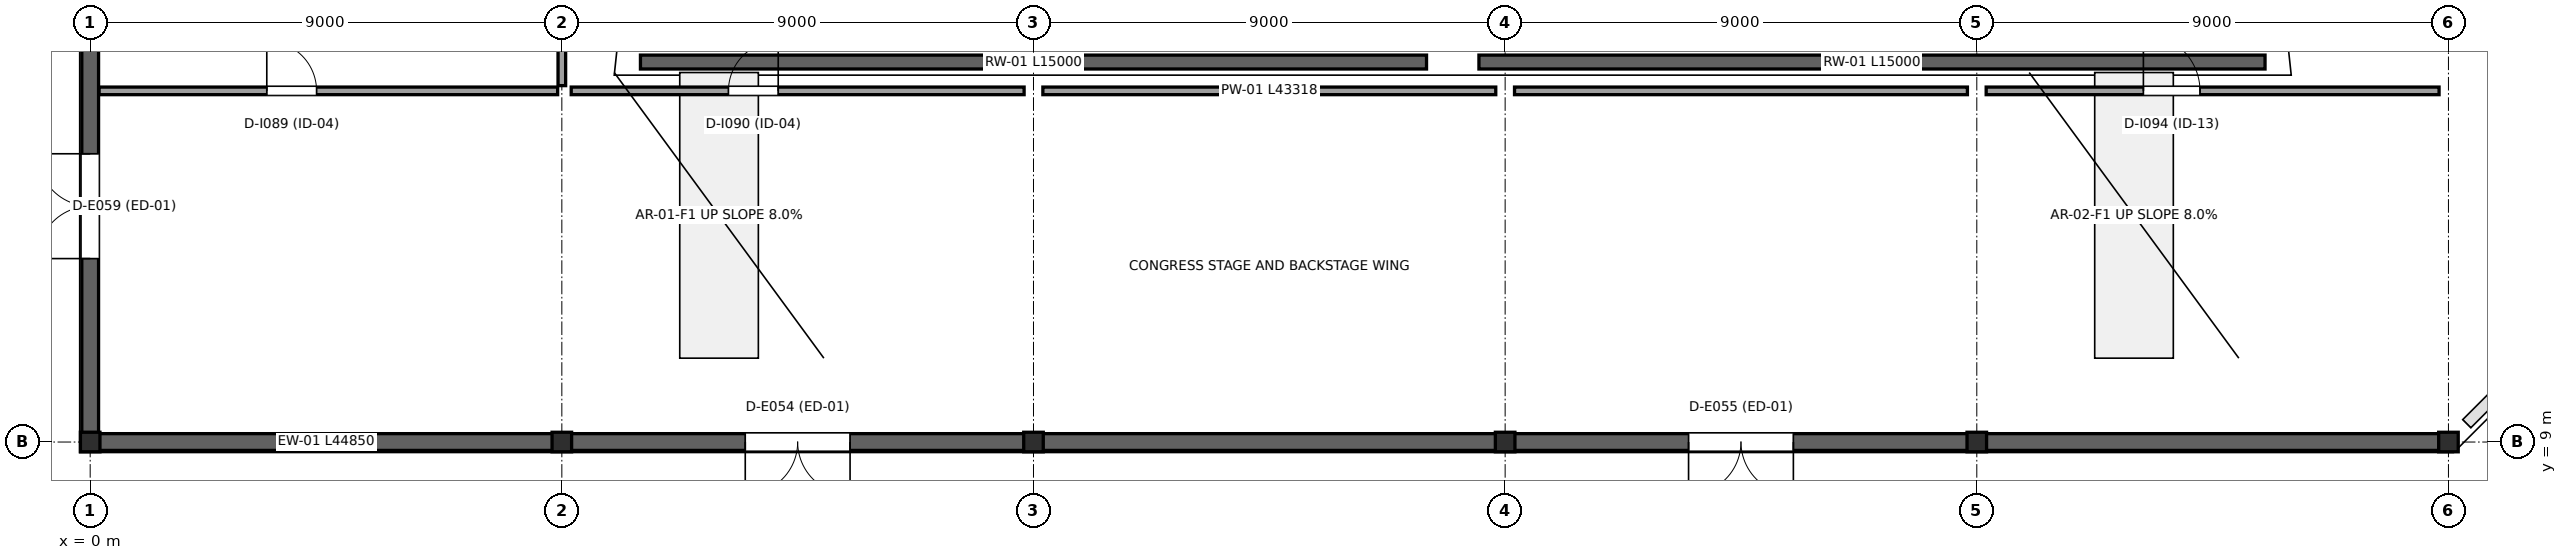
"""IFC4 building model, lengths in metres.
Left out: names, types, materials, properties, quantities, classifications, styles, units other than length and angle.
Written with IfcOpenShell. Run it as: python <this file> out.ifc"""

import sys

from ifc_helpers import new_model, si_unit, direction, frame, frame_2d, origin, origin_2d, place, context, subcontext, project, spatial, rectangle, i_section, extrude, element, fill, save


model = new_model("IFC4")
c1 = context("Model", 3, precision=1e-05, world=origin(), true_north=direction((0.0, 1.0)))
c2 = subcontext(c1, "Body", "Model", "MODEL_VIEW")
j1 = project(units=[si_unit("LENGTHUNIT", "METRE"), si_unit("PLANEANGLEUNIT", "RADIAN")], contexts=[c1])
p1 = place(None, origin())
s1 = spatial("IfcSite", under=j1, at=p1, CompositionType="ELEMENT")
p2 = place(p1, origin())
s2 = spatial("IfcBuilding", under=s1, at=p2, CompositionType="ELEMENT")
p3 = place(p2, origin())
s3 = spatial("IfcBuildingStorey", under=s2, at=p3, CompositionType="ELEMENT", Elevation=0.0)
for number, where, z_axis, x_axis in (
    (1, (0.0, 9.0, 0.0), (0.0, 0.0, 1.0), (1.0, 0.0, 0.0)),
    (2, (9.0, 9.0, 0.0), (0.0, 0.0, 1.0), (1.0, 0.0, 0.0)),
    (3, (18.0, 9.0, 0.0), (0.0, 0.0, 1.0), (1.0, 0.0, 0.0)),
    (4, (27.0, 9.0, 0.0), (0.0, 0.0, 1.0), (1.0, 0.0, 0.0)),
    (5, (36.0, 9.0, 0.0), (0.0, 0.0, 1.0), (1.0, 0.0, 0.0)),
    (6, (45.0, 9.0, 0.0), (0.0, 0.0, 1.0), (1.0, 0.0, 0.0)),
):
    element("IfcColumn", number, at=place(p3, frame(where, z_axis=z_axis, x_axis=x_axis)), inside=s3, PredefinedType="COLUMN", context=c2, shape_type="SweptSolid", body=[
        extrude(i_section(OverallWidth=0.373, OverallDepth=0.373, WebThickness=0.016, FlangeThickness=0.026, at=origin_2d()), origin(), (0.0, 0.0, 1.0), 6.0),
    ])
for number, where, z_axis, x_axis in (
    (7, (10.5, 16.25, 0.0), (0.0, 0.0, 1.0), (1.0, 0.0, 0.0)),
    (8, (26.5, 16.25, 0.0), (0.0, 0.0, 1.0), (1.0, 0.0, 0.0)),
):
    element("IfcWall", number, at=place(p3, frame(where, z_axis=z_axis, x_axis=x_axis)), inside=s3, PredefinedType="SHEAR", context=c2, shape_type="SweptSolid", body=[
        extrude(rectangle(XDim=15.0, YDim=0.265, at=frame_2d((7.5, 0.0))), origin(), (0.0, 0.0, 1.0), 0.13),
    ])
p4 = place(p3, frame((8.985, 9.0, 0.0), z_axis=(0.0, 0.0, 1.0), x_axis=(-1.0, 0.0, 0.0)))
e9 = element("IfcWall", 9, at=p4, inside=s3, PredefinedType="STANDARD", context=c2, shape_type="SweptSolid", body=[
    extrude(rectangle(XDim=8.97, YDim=0.32, at=frame_2d((4.485, 0.0))), origin(), (0.0, 0.0, 1.0), 6.0),
])
p5 = place(p3, frame((17.985, 9.0, 0.0), z_axis=(0.0, 0.0, 1.0), x_axis=(-1.0, 0.0, 0.0)))
e10 = element("IfcWall", 10, at=p5, inside=s3, PredefinedType="STANDARD", context=c2, shape_type="SweptSolid", body=[
    extrude(rectangle(XDim=8.97, YDim=0.32, at=frame_2d((4.485, 0.0))), origin(), (0.0, 0.0, 1.0), 6.0),
])
p6 = place(p5, frame((3.485, 0.0, 0.0)))
e11 = element("IfcOpeningElement", 11, at=p6, cuts=e10, PredefinedType="OPENING", context=c2, shape_type="SweptSolid", body=[
    extrude(rectangle(XDim=2.0, YDim=2.4, at=frame_2d((1.0, 1.2))), frame((0.0, 0.17, 0.0), z_axis=(0.0, -1.0, 0.0), x_axis=(1.0, 0.0, 0.0)), (0.0, 0.0, 1.0), 0.34),
])
p7 = place(p3, frame((26.985, 9.0, 0.0), z_axis=(0.0, 0.0, 1.0), x_axis=(-1.0, 0.0, 0.0)))
e12 = element("IfcWall", 12, at=p7, inside=s3, PredefinedType="STANDARD", context=c2, shape_type="SweptSolid", body=[
    extrude(rectangle(XDim=8.97, YDim=0.32, at=frame_2d((4.485, 0.0))), origin(), (0.0, 0.0, 1.0), 6.0),
])
p8 = place(p3, frame((35.985, 9.0, 0.0), z_axis=(0.0, 0.0, 1.0), x_axis=(-1.0, 0.0, 0.0)))
e13 = element("IfcWall", 13, at=p8, inside=s3, PredefinedType="STANDARD", context=c2, shape_type="SweptSolid", body=[
    extrude(rectangle(XDim=8.97, YDim=0.32, at=frame_2d((4.485, 0.0))), origin(), (0.0, 0.0, 1.0), 6.0),
])
p9 = place(p8, frame((3.485, 0.0, 0.0)))
e14 = element("IfcOpeningElement", 14, at=p9, cuts=e13, PredefinedType="OPENING", context=c2, shape_type="SweptSolid", body=[
    extrude(rectangle(XDim=2.0, YDim=2.4, at=frame_2d((1.0, 1.2))), frame((0.0, 0.17, 0.0), z_axis=(0.0, -1.0, 0.0), x_axis=(1.0, 0.0, 0.0)), (0.0, 0.0, 1.0), 0.34),
])
p10 = place(p3, frame((44.985, 9.0, 0.0), z_axis=(0.0, 0.0, 1.0), x_axis=(-1.0, 0.0, 0.0)))
e15 = element("IfcWall", 15, at=p10, inside=s3, PredefinedType="STANDARD", context=c2, shape_type="SweptSolid", body=[
    extrude(rectangle(XDim=8.97, YDim=0.32, at=frame_2d((4.485, 0.0))), origin(), (0.0, 0.0, 1.0), 6.0),
])
p11 = place(p3, frame((0.0, 9.18, 0.0), z_axis=(0.0, 0.0, 1.0), x_axis=(0.0, 1.0, 0.0)))
e16 = element("IfcWall", 16, at=p11, inside=s3, PredefinedType="STANDARD", context=c2, shape_type="SweptSolid", body=[
    extrude(rectangle(XDim=8.64, YDim=0.32, at=frame_2d((4.32, 0.0))), origin(), (0.0, 0.0, 1.0), 6.0),
])
p12 = place(p11, frame((3.32, 0.0, 0.0)))
e17 = element("IfcOpeningElement", 17, at=p12, cuts=e16, PredefinedType="OPENING", context=c2, shape_type="SweptSolid", body=[
    extrude(rectangle(XDim=2.0, YDim=2.4, at=frame_2d((1.0, 1.2))), frame((0.0, 0.17, 0.0), z_axis=(0.0, -1.0, 0.0), x_axis=(1.0, 0.0, 0.0)), (0.0, 0.0, 1.0), 0.34),
])
p13 = place(p3, frame((9.0, 15.8, 0.0), z_axis=(0.0, 0.0, 1.0), x_axis=(0.0, 1.0, 0.0)))
e18 = element("IfcWall", 18, at=p13, inside=s3, PredefinedType="PARTITIONING", context=c2, shape_type="SweptSolid", body=[
    extrude(rectangle(XDim=10.95, YDim=0.145, at=frame_2d((5.475, 0.0))), origin(), (0.0, 0.0, 1.0), 4.65),
])
p14 = place(p13, frame((3.0, 0.0, 0.0)))
e19 = element("IfcOpeningElement", 19, at=p14, cuts=e18, PredefinedType="OPENING", context=c2, shape_type="SweptSolid", body=[
    extrude(rectangle(XDim=0.95, YDim=2.12, at=frame_2d((0.475, 1.06))), frame((0.0, 0.083, 0.0), z_axis=(0.0, -1.0, 0.0), x_axis=(1.0, 0.0, 0.0)), (0.0, 0.0, 1.0), 0.165),
])
p15 = place(p3, frame((0.17, 15.7, 0.0), z_axis=(0.0, 0.0, 1.0), x_axis=(1.0, 0.0, 0.0)))
e20 = element("IfcWall", 20, at=p15, inside=s3, PredefinedType="PARTITIONING", context=c2, shape_type="SweptSolid", body=[
    extrude(rectangle(XDim=8.75, YDim=0.145, at=frame_2d((4.375, 0.0))), origin(), (0.0, 0.0, 1.0), 4.65),
])
p16 = place(p15, frame((3.2, 0.0, 0.0)))
e21 = element("IfcOpeningElement", 21, at=p16, cuts=e20, PredefinedType="OPENING", context=c2, shape_type="SweptSolid", body=[
    extrude(rectangle(XDim=0.95, YDim=2.12, at=frame_2d((0.475, 1.06))), frame((0.0, 0.083, 0.0), z_axis=(0.0, -1.0, 0.0), x_axis=(1.0, 0.0, 0.0)), (0.0, 0.0, 1.0), 0.165),
])
p17 = place(p3, frame((9.179, 15.7, 0.0), z_axis=(0.0, 0.0, 1.0), x_axis=(1.0, 0.0, 0.0)))
e22 = element("IfcWall", 22, at=p17, inside=s3, PredefinedType="PARTITIONING", context=c2, shape_type="SweptSolid", body=[
    extrude(rectangle(XDim=8.642, YDim=0.145, at=frame_2d((4.321, 0.0))), origin(), (0.0, 0.0, 1.0), 4.65),
])
p18 = place(p17, frame((3.0, 0.0, 0.0)))
e23 = element("IfcOpeningElement", 23, at=p18, cuts=e22, PredefinedType="OPENING", context=c2, shape_type="SweptSolid", body=[
    extrude(rectangle(XDim=0.95, YDim=2.12, at=frame_2d((0.475, 1.06))), frame((0.0, 0.083, 0.0), z_axis=(0.0, -1.0, 0.0), x_axis=(1.0, 0.0, 0.0)), (0.0, 0.0, 1.0), 0.165),
])
for number, where, z_axis, x_axis in (
    (24, (18.179, 15.7, 0.0), (0.0, 0.0, 1.0), (1.0, 0.0, 0.0)),
    (25, (27.179, 15.7, 0.0), (0.0, 0.0, 1.0), (1.0, 0.0, 0.0)),
):
    element("IfcWall", number, at=place(p3, frame(where, z_axis=z_axis, x_axis=x_axis)), inside=s3, PredefinedType="PARTITIONING", context=c2, shape_type="SweptSolid", body=[
        extrude(rectangle(XDim=8.642, YDim=0.145, at=frame_2d((4.321, 0.0))), origin(), (0.0, 0.0, 1.0), 4.65),
    ])
p19 = place(p3, frame((36.179, 15.7, 0.0), z_axis=(0.0, 0.0, 1.0), x_axis=(1.0, 0.0, 0.0)))
e26 = element("IfcWall", 26, at=p19, inside=s3, PredefinedType="PARTITIONING", context=c2, shape_type="SweptSolid", body=[
    extrude(rectangle(XDim=8.642, YDim=0.145, at=frame_2d((4.321, 0.0))), origin(), (0.0, 0.0, 1.0), 4.65),
])
p20 = place(p19, frame((3.0, 0.0, 0.0)))
e27 = element("IfcOpeningElement", 27, at=p20, cuts=e26, PredefinedType="OPENING", context=c2, shape_type="SweptSolid", body=[
    extrude(rectangle(XDim=1.08, YDim=2.26, at=frame_2d((0.54, 1.13))), frame((0.0, 0.083, 0.0), z_axis=(0.0, -1.0, 0.0), x_axis=(1.0, 0.0, 0.0)), (0.0, 0.0, 1.0), 0.165),
])
p21 = place(p6, origin())
e28 = element("IfcDoor", 28, at=p21, inside=s3, OperationType="DOUBLE_DOOR_SINGLE_SWING", PredefinedType="DOOR", context=c2, shape_type="SweptSolid", body=[
    extrude(rectangle(XDim=2.0, YDim=2.4, at=frame_2d((1.0, 1.2))), frame((0.0, 0.025, 0.0), z_axis=(0.0, -1.0, 0.0), x_axis=(1.0, 0.0, 0.0)), (0.0, 0.0, 1.0), 0.05),
])
fill(e11, e28)
p22 = place(p9, origin())
e29 = element("IfcDoor", 29, at=p22, inside=s3, OperationType="DOUBLE_DOOR_SINGLE_SWING", PredefinedType="DOOR", context=c2, shape_type="SweptSolid", body=[
    extrude(rectangle(XDim=2.0, YDim=2.4, at=frame_2d((1.0, 1.2))), frame((0.0, 0.025, 0.0), z_axis=(0.0, -1.0, 0.0), x_axis=(1.0, 0.0, 0.0)), (0.0, 0.0, 1.0), 0.05),
])
fill(e14, e29)
p23 = place(p12, origin())
e30 = element("IfcDoor", 30, at=p23, inside=s3, OperationType="DOUBLE_DOOR_SINGLE_SWING", PredefinedType="DOOR", context=c2, shape_type="SweptSolid", body=[
    extrude(rectangle(XDim=2.0, YDim=2.4, at=frame_2d((1.0, 1.2))), frame((0.0, 0.025, 0.0), z_axis=(0.0, -1.0, 0.0), x_axis=(1.0, 0.0, 0.0)), (0.0, 0.0, 1.0), 0.05),
])
fill(e17, e30)
p24 = place(p16, origin())
e31 = element("IfcDoor", 31, at=p24, inside=s3, OperationType="SINGLE_SWING_LEFT", PredefinedType="DOOR", context=c2, shape_type="SweptSolid", body=[
    extrude(rectangle(XDim=0.95, YDim=2.12, at=frame_2d((0.475, 1.06))), frame((0.0, 0.025, 0.0), z_axis=(0.0, -1.0, 0.0), x_axis=(1.0, 0.0, 0.0)), (0.0, 0.0, 1.0), 0.05),
])
fill(e21, e31)
p25 = place(p18, origin())
e32 = element("IfcDoor", 32, at=p25, inside=s3, OperationType="SINGLE_SWING_RIGHT", PredefinedType="DOOR", context=c2, shape_type="SweptSolid", body=[
    extrude(rectangle(XDim=0.95, YDim=2.12, at=frame_2d((0.475, 1.06))), frame((0.0, 0.025, 0.0), z_axis=(0.0, -1.0, 0.0), x_axis=(1.0, 0.0, 0.0)), (0.0, 0.0, 1.0), 0.05),
])
fill(e23, e32)
p26 = place(p20, origin())
e33 = element("IfcDoor", 33, at=p26, inside=s3, OperationType="SINGLE_SWING_LEFT", PredefinedType="DOOR", context=c2, shape_type="SweptSolid", body=[
    extrude(rectangle(XDim=1.08, YDim=2.26, at=frame_2d((0.54, 1.13))), frame((0.0, 0.025, 0.0), z_axis=(0.0, -1.0, 0.0), x_axis=(1.0, 0.0, 0.0)), (0.0, 0.0, 1.0), 0.05),
])
fill(e27, e33)
save(model, sys.argv[1])
